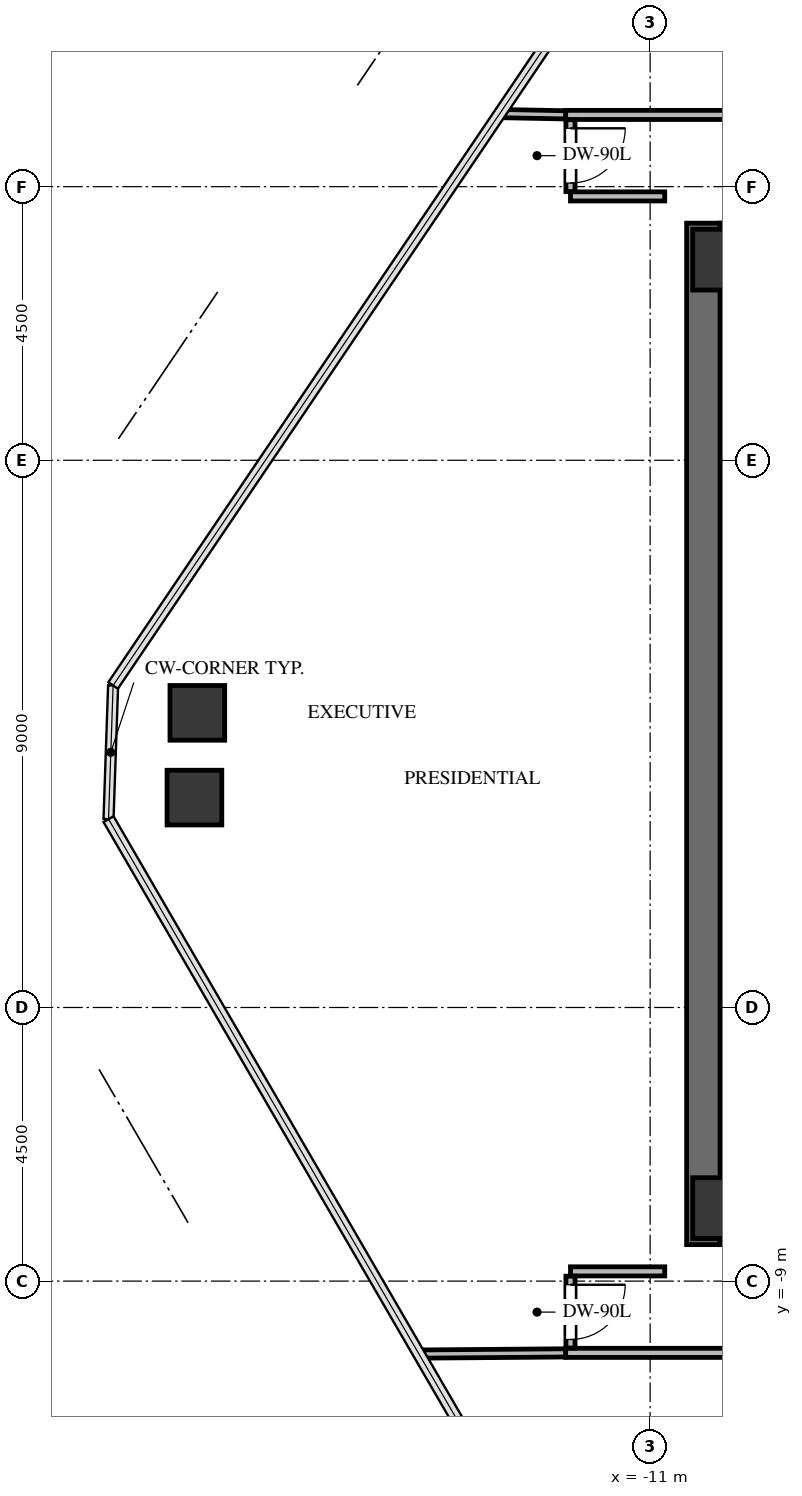
"""IFC4 building model, lengths in metres.
Left out: names, types, materials, properties, quantities, classifications, styles, units other than length and angle.
Written with IfcOpenShell. Run it as: python <this file> out.ifc"""

import sys

from ifc_helpers import new_model, si_unit, direction, frame, frame_2d, origin, origin_2d, place, context, subcontext, project, spatial, rectangle, extrude, source, transform, mapped, element, fill, save


model = new_model("IFC4")
c1 = context("Model", 3, precision=1e-05, world=origin(), true_north=direction((0.0, 1.0)))
c2 = subcontext(c1, "Body", "Model", "MODEL_VIEW")
j1 = project(units=[si_unit("LENGTHUNIT", "METRE"), si_unit("PLANEANGLEUNIT", "RADIAN")], contexts=[c1])
p1 = place(None, origin())
s1 = spatial("IfcSite", under=j1, at=p1, CompositionType="ELEMENT")
p2 = place(p1, origin())
s2 = spatial("IfcBuilding", under=s1, at=p2, CompositionType="ELEMENT")
p3 = place(p2, frame((0.0, 0.0, 224.9)))
s3 = spatial("IfcBuildingStorey", under=s2, at=p3, CompositionType="ELEMENT", Elevation=224.9)
p4 = place(p3, frame((-10.125, -8.4, 0.0), z_axis=(0.0, 0.0, 1.0), x_axis=(0.0, 1.0, 0.0)))
e1 = element("IfcWall", 1, at=p4, inside=s3, PredefinedType="SHEAR", context=c2, shape_type="SweptSolid", body=[
    extrude(rectangle(XDim=16.8, YDim=0.55, at=frame_2d((8.4, 0.0))), origin(), (0.0, 0.0, 1.0), 3.3),
])
p5 = place(p3, frame((-9.85, -8.125, 0.0), z_axis=(0.0, 0.0, 1.0), x_axis=(1.0, 0.0, 0.0)))
e2 = element("IfcWall", 2, at=p5, inside=s3, PredefinedType="SHEAR", context=c2, shape_type="SweptSolid", body=[
    extrude(rectangle(XDim=7.75, YDim=0.55, at=frame_2d((3.875, 0.0))), origin(), (0.0, 0.0, 1.0), 3.3),
])
p6 = place(p3, frame((-9.85, 8.125, 0.0), z_axis=(0.0, 0.0, 1.0), x_axis=(1.0, 0.0, 0.0)))
e3 = element("IfcWall", 3, at=p6, inside=s3, PredefinedType="SHEAR", context=c2, shape_type="SweptSolid", body=[
    extrude(rectangle(XDim=19.7, YDim=0.55, at=frame_2d((9.85, 0.0))), origin(), (0.0, 0.0, 1.0), 3.3),
])
m1 = source(origin(), c2, "Body", "SweptSolid", [
    extrude(rectangle(XDim=1.0, YDim=1.0, at=origin_2d()), origin(), (0.0, 0.0, 1.0), 3.3),
])
for number, where, z_axis, x_axis in (
    (4, (-9.8, -7.8, -0.24), (0.0, 0.0, 1.0), (1.0, 0.0, 0.0)),
    (5, (-9.8, 7.8, -0.24), (0.0, 0.0, 1.0), (1.0, 0.0, 0.0)),
):
    element("IfcColumn", number, at=place(p3, frame(where, z_axis=z_axis, x_axis=x_axis)), inside=s3, PredefinedType="COLUMN", context=c2, shape_type="MappedRepresentation", body=[
        mapped(m1, transform((0.0, 0.0, 0.0), x_axis=(1.0, 0.0, 0.0), y_axis=(0.0, 1.0, 0.0), z_axis=(0.0, 0.0, 1.0), scale=1.0)),
    ])
m2 = source(origin(), c2, "Body", "SweptSolid", [
    extrude(rectangle(XDim=0.9, YDim=0.9, at=origin_2d()), origin(), (0.0, 0.0, 1.0), 3.3),
])
for number, where, z_axis, x_axis in (
    (6, (-18.494, -1.048, -0.24), (0.0, 0.0, 1.0), (1.0, 0.0, 0.0)),
    (7, (-18.446, 0.346, -0.24), (0.0, 0.0, 1.0), (1.0, 0.0, 0.0)),
):
    element("IfcColumn", number, at=place(p3, frame(where, z_axis=z_axis, x_axis=x_axis)), inside=s3, PredefinedType="COLUMN", context=c2, shape_type="MappedRepresentation", body=[
        mapped(m2, transform((0.0, 0.0, 0.0), x_axis=(1.0, 0.0, 0.0), y_axis=(0.0, 1.0, 0.0), z_axis=(0.0, 0.0, 1.0), scale=1.0)),
    ])
p7 = place(p3, frame((-1.01, 10.18, 0.0), z_axis=(0.0, 0.0, 1.0), x_axis=(-1.0, 0.0, 0.0)))
e8 = element("IfcWall", 8, at=p7, inside=s3, PredefinedType="PARTITIONING", context=c2, shape_type="SweptSolid", body=[
    extrude(rectangle(XDim=11.38, YDim=0.15, at=frame_2d((5.69, 0.0))), origin(), (0.0, 0.0, 1.0), 2.302),
])
p8 = place(p7, frame((5.23, 0.0, 0.0)))
e9 = element("IfcOpeningElement", 9, at=p8, cuts=e8, PredefinedType="OPENING", context=c2, shape_type="SweptSolid", body=[
    extrude(rectangle(XDim=0.92, YDim=2.1, at=frame_2d((0.46, 1.05))), frame((0.0, 0.085, 0.0), z_axis=(0.0, -1.0, 0.0), x_axis=(1.0, 0.0, 0.0)), (0.0, 0.0, 1.0), 0.17),
])
p9 = place(p3, frame((-12.39, -10.18, 0.0), z_axis=(0.0, 0.0, 1.0), x_axis=(1.0, 0.0, 0.0)))
e10 = element("IfcWall", 10, at=p9, inside=s3, PredefinedType="PARTITIONING", context=c2, shape_type="SweptSolid", body=[
    extrude(rectangle(XDim=11.38, YDim=0.15, at=frame_2d((5.69, 0.0))), origin(), (0.0, 0.0, 1.0), 2.302),
])
p10 = place(p9, frame((5.23, 0.0, 0.0)))
e11 = element("IfcOpeningElement", 11, at=p10, cuts=e10, PredefinedType="OPENING", context=c2, shape_type="SweptSolid", body=[
    extrude(rectangle(XDim=0.92, YDim=2.1, at=frame_2d((0.46, 1.05))), frame((0.0, 0.085, 0.0), z_axis=(0.0, -1.0, 0.0), x_axis=(1.0, 0.0, 0.0)), (0.0, 0.0, 1.0), 0.17),
])
p11 = place(p3, frame((-10.76, -8.84, 0.0), z_axis=(0.0, 0.0, 1.0), x_axis=(-1.0, 0.0, 0.0)))
e12 = element("IfcWall", 12, at=p11, inside=s3, PredefinedType="PARTITIONING", context=c2, shape_type="SweptSolid", body=[
    extrude(rectangle(XDim=1.55, YDim=0.15, at=frame_2d((0.775, 0.0))), origin(), (0.0, 0.0, 1.0), 3.045),
])
p12 = place(p3, frame((-12.31, -8.919, 0.0), z_axis=(0.0, 0.0, 1.0), x_axis=(0.0, -1.0, 0.0)))
e13 = element("IfcWall", 13, at=p12, inside=s3, PredefinedType="PARTITIONING", context=c2, shape_type="SweptSolid", body=[
    extrude(rectangle(XDim=1.182, YDim=0.15, at=frame_2d((0.591, 0.0))), origin(), (0.0, 0.0, 1.0), 3.045),
])
p13 = place(p12, frame((0.141, 0.0, 0.0)))
e14 = element("IfcOpeningElement", 14, at=p13, cuts=e13, PredefinedType="OPENING", context=c2, shape_type="SweptSolid", body=[
    extrude(rectangle(XDim=0.9, YDim=2.05, at=frame_2d((0.45, 1.025))), frame((0.0, 0.085, 0.0), z_axis=(0.0, -1.0, 0.0), x_axis=(1.0, 0.0, 0.0)), (0.0, 0.0, 1.0), 0.17),
])
p14 = place(p3, frame((-12.31, 8.84, 0.0), z_axis=(0.0, 0.0, 1.0), x_axis=(1.0, 0.0, 0.0)))
e15 = element("IfcWall", 15, at=p14, inside=s3, PredefinedType="PARTITIONING", context=c2, shape_type="SweptSolid", body=[
    extrude(rectangle(XDim=1.55, YDim=0.15, at=frame_2d((0.775, 0.0))), origin(), (0.0, 0.0, 1.0), 3.045),
])
p15 = place(p3, frame((-12.31, 10.101, 0.0), z_axis=(0.0, 0.0, 1.0), x_axis=(0.0, -1.0, 0.0)))
e16 = element("IfcWall", 16, at=p15, inside=s3, PredefinedType="PARTITIONING", context=c2, shape_type="SweptSolid", body=[
    extrude(rectangle(XDim=1.182, YDim=0.15, at=frame_2d((0.591, 0.0))), origin(), (0.0, 0.0, 1.0), 2.399),
])
p16 = place(p15, frame((0.141, 0.0, 0.0)))
e17 = element("IfcOpeningElement", 17, at=p16, cuts=e16, PredefinedType="OPENING", context=c2, shape_type="SweptSolid", body=[
    extrude(rectangle(XDim=0.9, YDim=2.05, at=frame_2d((0.45, 1.025))), frame((0.0, 0.085, 0.0), z_axis=(0.0, -1.0, 0.0), x_axis=(1.0, 0.0, 0.0)), (0.0, 0.0, 1.0), 0.17),
])
p17 = place(p3, frame((-12.39, 10.181, 0.0), z_axis=(0.0, 0.0, 1.0), x_axis=(-0.999812128272, 0.019383192748, 0.0)))
e18 = element("IfcWall", 18, at=p17, inside=s3, PredefinedType="PARTITIONING", context=c2, shape_type="SweptSolid", body=[
    extrude(rectangle(XDim=1.083, YDim=0.135, at=frame_2d((0.542, 0.0))), origin(), (0.0, 0.0, 1.0), 3.045),
])
p18 = place(p3, frame((-14.802, -10.2, 0.0), z_axis=(0.0, 0.0, 1.0), x_axis=(0.999968020968, 0.007997314604, 0.0)))
e19 = element("IfcWall", 19, at=p18, inside=s3, PredefinedType="PARTITIONING", context=c2, shape_type="SweptSolid", body=[
    extrude(rectangle(XDim=2.412, YDim=0.135, at=frame_2d((1.206, 0.0))), origin(), (0.0, 0.0, 1.0), 2.399),
])
m3 = source(origin(), c2, "Body", "SweptSolid", [
    extrude(rectangle(XDim=0.9, YDim=2.05, at=frame_2d((0.45, 1.025))), frame((0.0, 0.025, 0.0), z_axis=(0.0, -1.0, 0.0), x_axis=(1.0, 0.0, 0.0)), (0.0, 0.0, 1.0), 0.05),
])
p19 = place(p13, origin())
e20 = element("IfcDoor", 20, at=p19, inside=s3, OperationType="SINGLE_SWING_LEFT", PredefinedType="DOOR", context=c2, shape_type="MappedRepresentation", body=[
    mapped(m3, transform((0.0, 0.0, 0.0), x_axis=(1.0, 0.0, 0.0), y_axis=(0.0, 1.0, 0.0), z_axis=(0.0, 0.0, 1.0), scale=1.0)),
])
fill(e14, e20)
p20 = place(p16, origin())
e21 = element("IfcDoor", 21, at=p20, inside=s3, OperationType="SINGLE_SWING_LEFT", PredefinedType="DOOR", context=c2, shape_type="MappedRepresentation", body=[
    mapped(m3, transform((0.0, 0.0, 0.0), x_axis=(1.0, 0.0, 0.0), y_axis=(0.0, 1.0, 0.0), z_axis=(0.0, 0.0, 1.0), scale=1.0)),
])
fill(e17, e21)
save(model, sys.argv[1])
